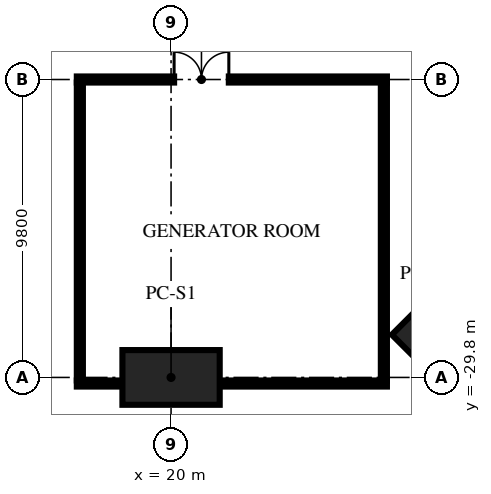
"""IFC4 building model, lengths in metres.
Left out: names, types, materials, properties, quantities, classifications, styles, units other than length and angle.
Written with IfcOpenShell. Run it as: python <this file> out.ifc"""

import sys

from ifc_helpers import new_model, si_unit, direction, frame, frame_2d, origin, origin_2d, place, context, subcontext, project, spatial, rectangle, hollow_rectangle, extrude, element, fill, save


model = new_model("IFC4")
c1 = context("Model", 3, precision=1e-05, world=origin(), true_north=direction((0.0, 1.0)))
c2 = subcontext(c1, "Body", "Model", "MODEL_VIEW")
j1 = project(units=[si_unit("LENGTHUNIT", "METRE"), si_unit("PLANEANGLEUNIT", "RADIAN")], contexts=[c1])
p1 = place(None, origin())
s1 = spatial("IfcSite", under=j1, at=p1, CompositionType="ELEMENT")
p2 = place(p1, origin())
s2 = spatial("IfcBuilding", under=s1, at=p2, CompositionType="ELEMENT")
p3 = place(p2, frame((0.0, 0.0, -5.4)))
s3 = spatial("IfcBuildingStorey", under=s2, at=p3, CompositionType="ELEMENT", Elevation=-5.4)
p4 = place(p3, frame((20.0, -29.8, 0.0), z_axis=(0.0, 0.0, 1.0), x_axis=(1.0, 0.0, 0.0)))
e1 = element("IfcColumn", 1, at=p4, inside=s3, PredefinedType="COLUMN", context=c2, shape_type="SweptSolid", body=[
    extrude(hollow_rectangle(XDim=3.2, YDim=1.8, WallThickness=0.2, at=origin_2d()), origin(), (0.0, 0.0, 1.0), 5.4),
])
p5 = place(p3, frame((28.394, -28.394, 0.0), z_axis=(0.0, 0.0, 1.0), x_axis=(0.707106781187, 0.707106781187, 0.0)))
e2 = element("IfcColumn", 2, at=p5, inside=s3, PredefinedType="COLUMN", context=c2, shape_type="SweptSolid", body=[
    extrude(hollow_rectangle(XDim=1.6, YDim=1.6, WallThickness=0.1, at=origin_2d()), origin(), (0.0, 0.0, 1.0), 5.4),
])
p6 = place(p3, frame((16.9, -30.0, 0.0), z_axis=(0.0, 0.0, 1.0), x_axis=(1.0, 0.0, 0.0)))
e3 = element("IfcWall", 3, at=p6, inside=s3, PredefinedType="SOLIDWALL", context=c2, shape_type="SweptSolid", body=[
    extrude(rectangle(XDim=1.47, YDim=0.2, at=frame_2d((0.735, 0.0))), origin(), (0.0, 0.0, 1.0), 4.1),
])
p7 = place(p3, frame((21.63, -30.0, 0.0), z_axis=(0.0, 0.0, 1.0), x_axis=(1.0, 0.0, 0.0)))
e4 = element("IfcWall", 4, at=p7, inside=s3, PredefinedType="SOLIDWALL", context=c2, shape_type="SweptSolid", body=[
    extrude(rectangle(XDim=5.47, YDim=0.2, at=frame_2d((2.735, 0.0))), origin(), (0.0, 0.0, 1.0), 4.8),
])
p8 = place(p3, frame((17.0, -29.9, 0.0), z_axis=(0.0, 0.0, 1.0), x_axis=(0.0, 1.0, 0.0)))
e5 = element("IfcWall", 5, at=p8, inside=s3, PredefinedType="SOLIDWALL", context=c2, shape_type="SweptSolid", body=[
    extrude(rectangle(XDim=9.8, YDim=0.2, at=frame_2d((4.9, 0.0))), origin(), (0.0, 0.0, 1.0), 4.1),
])
p9 = place(p3, frame((27.0, -29.9, 0.0), z_axis=(0.0, 0.0, 1.0), x_axis=(0.0, 1.0, 0.0)))
e6 = element("IfcWall", 6, at=p9, inside=s3, PredefinedType="SOLIDWALL", context=c2, shape_type="SweptSolid", body=[
    extrude(rectangle(XDim=9.8, YDim=0.2, at=frame_2d((4.9, 0.0))), origin(), (0.0, 0.0, 1.0), 3.9),
])
p10 = place(p3, frame((16.9, -20.0, 0.0), z_axis=(0.0, 0.0, 1.0), x_axis=(1.0, 0.0, 0.0)))
e7 = element("IfcWall", 7, at=p10, inside=s3, PredefinedType="SOLIDWALL", context=c2, shape_type="SweptSolid", body=[
    extrude(rectangle(XDim=10.2, YDim=0.2, at=frame_2d((5.1, 0.0))), origin(), (0.0, 0.0, 1.0), 3.9),
])
p11 = place(p10, frame((3.2, 0.0, 0.0)))
e8 = element("IfcOpeningElement", 8, at=p11, cuts=e7, PredefinedType="OPENING", context=c2, shape_type="SweptSolid", body=[
    extrude(rectangle(XDim=1.8, YDim=2.4, at=frame_2d((0.9, 1.2))), frame((0.0, 0.11, 0.0), z_axis=(0.0, -1.0, 0.0), x_axis=(1.0, 0.0, 0.0)), (0.0, 0.0, 1.0), 0.22),
])
p12 = place(p11, origin())
e9 = element("IfcDoor", 9, at=p12, inside=s3, OperationType="DOUBLE_DOOR_SINGLE_SWING", PredefinedType="DOOR", context=c2, shape_type="SweptSolid", body=[
    extrude(rectangle(XDim=1.8, YDim=2.4, at=frame_2d((0.9, 1.2))), frame((0.0, 0.025, 0.0), z_axis=(0.0, -1.0, 0.0), x_axis=(1.0, 0.0, 0.0)), (0.0, 0.0, 1.0), 0.05),
])
fill(e8, e9)
save(model, sys.argv[1])
